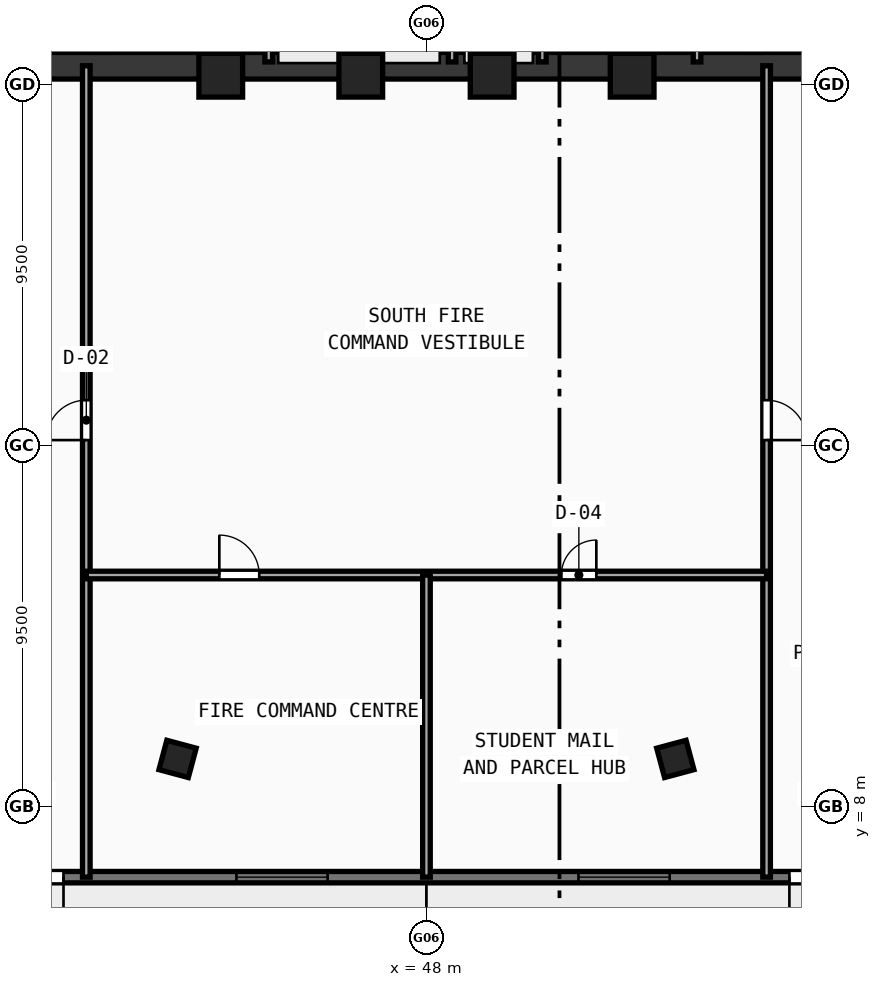
"""IFC4 building model, lengths in metres.
Left out: names, types, materials, properties, quantities, classifications, styles, units other than length and angle.
Written with IfcOpenShell. Run it as: python <this file> out.ifc"""

import sys

from ifc_helpers import new_model, si_unit, direction, frame, frame_2d, origin, origin_with_axes, origin_2d, place, context, subcontext, project, spatial, rectangle, hollow_rectangle, extrude, source, transform, mapped, element, fill, save


model = new_model("IFC4")
c1 = context("Model", 3, precision=1e-05, world=origin(), true_north=direction((0.0, 1.0)))
c2 = subcontext(c1, "Body", "Model", "MODEL_VIEW")
j1 = project(units=[si_unit("LENGTHUNIT", "METRE"), si_unit("PLANEANGLEUNIT", "RADIAN")], contexts=[c1])
p1 = place(None, origin())
s1 = spatial("IfcSite", under=j1, at=p1, CompositionType="ELEMENT")
p2 = place(p1, origin())
s2 = spatial("IfcBuilding", under=s1, at=p2, CompositionType="ELEMENT")
p3 = place(p2, origin())
s3 = spatial("IfcBuildingStorey", under=s2, at=p3, CompositionType="ELEMENT", Elevation=0.0)
p4 = place(p3, frame((35.45, 27.5, 0.0), z_axis=(0.0, 0.0, 1.0), x_axis=(1.0, 0.0, 0.0)))
e1 = element("IfcWall", 1, at=p4, inside=s3, PredefinedType="SHEAR", context=c2, shape_type="SweptSolid", body=[
    extrude(rectangle(XDim=25.1, YDim=0.7, at=frame_2d((12.55, 0.0))), origin(), (0.0, 0.0, 1.0), 4.52),
])
m1 = source(origin(), c2, "Body", "SweptSolid", [
    extrude(hollow_rectangle(XDim=1.15, YDim=1.15, WallThickness=0.048, at=origin_2d()), origin(), (0.0, 0.0, 1.0), 4.8),
])
for number, where, z_axis, x_axis in (
    (2, (42.588, 27.25, -0.28), (0.0, 0.0, 1.0), (1.0, 0.0, 0.0)),
    (3, (46.272, 27.25, -0.28), (0.0, 0.0, 1.0), (1.0, 0.0, 0.0)),
    (4, (49.729, 27.25, -0.28), (0.0, 0.0, 1.0), (1.0, 0.0, 0.0)),
    (5, (53.412, 27.25, -0.28), (0.0, 0.0, 1.0), (1.0, 0.0, 0.0)),
):
    element("IfcColumn", number, at=place(p3, frame(where, z_axis=z_axis, x_axis=x_axis)), inside=s3, PredefinedType="COLUMN", context=c2, shape_type="MappedRepresentation", body=[
        mapped(m1, transform((0.0, 0.0, 0.0), scale=1.0)),
    ])
m2 = source(origin(), c2, "Body", "SweptSolid", [
    extrude(hollow_rectangle(XDim=0.8, YDim=0.8, WallThickness=0.032, at=origin_2d()), origin(), (0.0, 0.0, 1.0), 4.8),
])
for number, where, z_axis, x_axis in (
    (6, (41.452, 9.261, -0.28), (0.0, 0.0, 1.0), (0.966, -0.259, 0.0)),
    (7, (54.548, 9.261, -0.28), (0.0, 0.0, 1.0), (0.966, 0.259, 0.0)),
):
    element("IfcColumn", number, at=place(p3, frame(where, z_axis=z_axis, x_axis=x_axis)), inside=s3, PredefinedType="COLUMN", context=c2, shape_type="MappedRepresentation", body=[
        mapped(m2, transform((0.0, 0.0, 0.0), scale=1.0)),
    ])
p5 = place(p3, frame((4.0, 6.15, 0.0), z_axis=(0.0, 0.0, 1.0), x_axis=(1.0, 0.0, 0.0)))
e8 = element("IfcWall", 8, at=p5, inside=s3, PredefinedType="STANDARD", context=c2, shape_type="SweptSolid", body=[
    extrude(rectangle(XDim=88.0, YDim=0.3, at=frame_2d((44.0, 0.0))), origin(), (0.0, 0.0, 1.0), 4.52),
])
p6 = place(p5, frame((32.05, 0.0, 0.0)))
e9 = element("IfcOpeningElement", 9, at=p6, cuts=e8, PredefinedType="OPENING", context=c2, shape_type="SweptSolid", body=[
    extrude(rectangle(XDim=2.4, YDim=2.2, at=frame_2d((1.2, 1.1))), frame((0.0, 0.16, 0.0), z_axis=(0.0, -1.0, 0.0), x_axis=(1.0, 0.0, 0.0)), (0.0, 0.0, 1.0), 0.32),
])
p7 = place(p5, frame((53.55, 0.0, 0.0)))
e10 = element("IfcOpeningElement", 10, at=p7, cuts=e8, PredefinedType="OPENING", context=c2, shape_type="SweptSolid", body=[
    extrude(rectangle(XDim=2.4, YDim=2.2, at=frame_2d((1.2, 1.1))), frame((0.0, 0.16, 0.0), z_axis=(0.0, -1.0, 0.0), x_axis=(1.0, 0.0, 0.0)), (0.0, 0.0, 1.0), 0.32),
])
p8 = place(p5, frame((68.0, 0.0, 0.0)))
e11 = element("IfcOpeningElement", 11, at=p8, cuts=e8, PredefinedType="OPENING", context=c2, shape_type="SweptSolid", body=[
    extrude(rectangle(XDim=2.4, YDim=2.2, at=frame_2d((1.2, 1.1))), frame((0.0, 0.16, 0.0), z_axis=(0.0, -1.0, 0.0), x_axis=(1.0, 0.0, 0.0)), (0.0, 0.0, 1.0), 0.32),
])
p9 = place(p5, frame((78.0, 0.0, 0.0)))
e12 = element("IfcOpeningElement", 12, at=p9, cuts=e8, PredefinedType="OPENING", context=c2, shape_type="SweptSolid", body=[
    extrude(rectangle(XDim=2.4, YDim=2.2, at=frame_2d((1.2, 1.1))), frame((0.0, 0.16, 0.0), z_axis=(0.0, -1.0, 0.0), x_axis=(1.0, 0.0, 0.0)), (0.0, 0.0, 1.0), 0.32),
])
p10 = place(p5, frame((9.0, 0.0, 0.9)))
e13 = element("IfcOpeningElement", 13, at=p10, cuts=e8, PredefinedType="OPENING", context=c2, shape_type="SweptSolid", body=[
    extrude(rectangle(XDim=2.4, YDim=1.8, at=frame_2d((1.2, 0.9))), frame((0.0, 0.16, 0.0), z_axis=(0.0, -1.0, 0.0), x_axis=(1.0, 0.0, 0.0)), (0.0, 0.0, 1.0), 0.32),
])
p11 = place(p5, frame((20.5, 0.0, 0.9)))
e14 = element("IfcOpeningElement", 14, at=p11, cuts=e8, PredefinedType="OPENING", context=c2, shape_type="SweptSolid", body=[
    extrude(rectangle(XDim=2.4, YDim=1.8, at=frame_2d((1.2, 0.9))), frame((0.0, 0.16, 0.0), z_axis=(0.0, -1.0, 0.0), x_axis=(1.0, 0.0, 0.0)), (0.0, 0.0, 1.0), 0.32),
])
p12 = place(p5, frame((39.0, 0.0, 0.9)))
e15 = element("IfcOpeningElement", 15, at=p12, cuts=e8, PredefinedType="OPENING", context=c2, shape_type="SweptSolid", body=[
    extrude(rectangle(XDim=2.4, YDim=1.8, at=frame_2d((1.2, 0.9))), frame((0.0, 0.16, 0.0), z_axis=(0.0, -1.0, 0.0), x_axis=(1.0, 0.0, 0.0)), (0.0, 0.0, 1.0), 0.32),
])
p13 = place(p5, frame((48.0, 0.0, 0.9)))
e16 = element("IfcOpeningElement", 16, at=p13, cuts=e8, PredefinedType="OPENING", context=c2, shape_type="SweptSolid", body=[
    extrude(rectangle(XDim=2.4, YDim=1.8, at=frame_2d((1.2, 0.9))), frame((0.0, 0.16, 0.0), z_axis=(0.0, -1.0, 0.0), x_axis=(1.0, 0.0, 0.0)), (0.0, 0.0, 1.0), 0.32),
])
p14 = place(p5, frame((61.5, 0.0, 0.9)))
e17 = element("IfcOpeningElement", 17, at=p14, cuts=e8, PredefinedType="OPENING", context=c2, shape_type="SweptSolid", body=[
    extrude(rectangle(XDim=2.4, YDim=1.8, at=frame_2d((1.2, 0.9))), frame((0.0, 0.16, 0.0), z_axis=(0.0, -1.0, 0.0), x_axis=(1.0, 0.0, 0.0)), (0.0, 0.0, 1.0), 0.32),
])
p15 = place(p3, frame((43.85, 27.6, 0.0), z_axis=(0.0, 0.0, 1.0), x_axis=(0.0, 1.0, 0.0)))
e18 = element("IfcWall", 18, at=p15, inside=s3, PredefinedType="SOLIDWALL", context=c2, shape_type="SweptSolid", body=[
    extrude(rectangle(XDim=6.22, YDim=0.2, at=frame_2d((3.11, 0.0))), origin(), (0.0, 0.0, 1.0), 4.52),
])
p16 = place(p15, frame((2.25, 0.0, 0.0)))
e19 = element("IfcOpeningElement", 19, at=p16, cuts=e18, PredefinedType="OPENING", context=c2, shape_type="SweptSolid", body=[
    extrude(rectangle(XDim=1.05, YDim=2.1, at=frame_2d((0.525, 1.05))), frame((0.0, 0.11, 0.0), z_axis=(0.0, -1.0, 0.0), x_axis=(1.0, 0.0, 0.0)), (0.0, 0.0, 1.0), 0.22),
])
p17 = place(p3, frame((53.68, 27.6, 0.0), z_axis=(0.0, 0.0, 1.0), x_axis=(0.0, 1.0, 0.0)))
e20 = element("IfcWall", 20, at=p17, inside=s3, PredefinedType="SOLIDWALL", context=c2, shape_type="SweptSolid", body=[
    extrude(rectangle(XDim=9.05, YDim=0.2, at=frame_2d((4.525, 0.0))), origin(), (0.0, 0.0, 1.0), 4.52),
])
p18 = place(p17, frame((6.9, 0.0, 0.0)))
e21 = element("IfcOpeningElement", 21, at=p18, cuts=e20, PredefinedType="OPENING", context=c2, shape_type="SweptSolid", body=[
    extrude(rectangle(XDim=1.05, YDim=2.1, at=frame_2d((0.525, 1.05))), frame((0.0, 0.11, 0.0), z_axis=(0.0, -1.0, 0.0), x_axis=(1.0, 0.0, 0.0)), (0.0, 0.0, 1.0), 0.22),
])
for number, where, z_axis, x_axis in (
    (22, (51.05, 27.6, 0.0), (0.0, 0.0, 1.0), (0.0, 1.0, 0.0)),
    (23, (46.225, 27.6, 0.0), (0.0, 0.0, 1.0), (0.0, 1.0, 0.0)),
    (24, (48.675, 27.6, 0.0), (0.0, 0.0, 1.0), (0.0, 1.0, 0.0)),
    (25, (55.12, 27.6, 0.0), (0.0, 0.0, 1.0), (0.0, 1.0, 0.0)),
):
    element("IfcWall", number, at=place(p3, frame(where, z_axis=z_axis, x_axis=x_axis)), inside=s3, PredefinedType="SOLIDWALL", context=c2, shape_type="SweptSolid", body=[
        extrude(rectangle(XDim=2.12, YDim=0.2, at=frame_2d((1.06, 0.0))), origin(), (0.0, 0.0, 1.0), 4.52),
    ])
p19 = place(p3, frame((42.32, 27.6, 0.0), z_axis=(0.0, 0.0, 1.0), x_axis=(0.0, 1.0, 0.0)))
e26 = element("IfcWall", 26, at=p19, inside=s3, PredefinedType="PARTITIONING", context=c2, shape_type="SweptSolid", body=[
    extrude(rectangle(XDim=5.9, YDim=0.16, at=frame_2d((2.95, 0.0))), origin(), (0.0, 0.0, 1.0), 4.52),
])
p20 = place(p19, frame((0.5, 0.0, 0.0)))
e27 = element("IfcOpeningElement", 27, at=p20, cuts=e26, PredefinedType="OPENING", context=c2, shape_type="SweptSolid", body=[
    extrude(rectangle(XDim=0.9, YDim=2.1, at=frame_2d((0.45, 1.05))), frame((0.0, 0.09, 0.0), z_axis=(0.0, -1.0, 0.0), x_axis=(1.0, 0.0, 0.0)), (0.0, 0.0, 1.0), 0.18),
])
p21 = place(p19, frame((2.45, 0.0, 0.0)))
e28 = element("IfcOpeningElement", 28, at=p21, cuts=e26, PredefinedType="OPENING", context=c2, shape_type="SweptSolid", body=[
    extrude(rectangle(XDim=0.9, YDim=2.1, at=frame_2d((0.45, 1.05))), frame((0.0, 0.09, 0.0), z_axis=(0.0, -1.0, 0.0), x_axis=(1.0, 0.0, 0.0)), (0.0, 0.0, 1.0), 0.18),
])
p22 = place(p19, frame((4.42, 0.0, 0.0)))
e29 = element("IfcOpeningElement", 29, at=p22, cuts=e26, PredefinedType="OPENING", context=c2, shape_type="SweptSolid", body=[
    extrude(rectangle(XDim=0.94, YDim=2.1, at=frame_2d((0.47, 1.05))), frame((0.0, 0.09, 0.0), z_axis=(0.0, -1.0, 0.0), x_axis=(1.0, 0.0, 0.0)), (0.0, 0.0, 1.0), 0.18),
])
p23 = place(p3, frame((39.05, 6.15, 0.0), z_axis=(0.0, 0.0, 1.0), x_axis=(0.0, 1.0, 0.0)))
e30 = element("IfcWall", 30, at=p23, inside=s3, PredefinedType="SOLIDWALL", context=c2, shape_type="SweptSolid", body=[
    extrude(rectangle(XDim=21.35, YDim=0.2, at=frame_2d((10.675, 0.0))), origin(), (0.0, 0.0, 1.0), 3.62),
])
p24 = place(p23, frame((11.5, 0.0, 0.0)))
e31 = element("IfcOpeningElement", 31, at=p24, cuts=e30, PredefinedType="OPENING", context=c2, shape_type="SweptSolid", body=[
    extrude(rectangle(XDim=1.05, YDim=2.1, at=frame_2d((0.525, 1.05))), frame((0.0, 0.11, 0.0), z_axis=(0.0, -1.0, 0.0), x_axis=(1.0, 0.0, 0.0)), (0.0, 0.0, 1.0), 0.22),
])
p25 = place(p3, frame((56.95, 6.15, 0.0), z_axis=(0.0, 0.0, 1.0), x_axis=(0.0, 1.0, 0.0)))
e32 = element("IfcWall", 32, at=p25, inside=s3, PredefinedType="SOLIDWALL", context=c2, shape_type="SweptSolid", body=[
    extrude(rectangle(XDim=21.35, YDim=0.2, at=frame_2d((10.675, 0.0))), origin(), (0.0, 0.0, 1.0), 3.62),
])
p26 = place(p25, frame((11.5, 0.0, 0.0)))
e33 = element("IfcOpeningElement", 33, at=p26, cuts=e32, PredefinedType="OPENING", context=c2, shape_type="SweptSolid", body=[
    extrude(rectangle(XDim=1.05, YDim=2.1, at=frame_2d((0.525, 1.05))), frame((0.0, 0.11, 0.0), z_axis=(0.0, -1.0, 0.0), x_axis=(1.0, 0.0, 0.0)), (0.0, 0.0, 1.0), 0.22),
])
p27 = place(p3, frame((39.05, 14.1, 0.0), z_axis=(0.0, 0.0, 1.0), x_axis=(1.0, 0.0, 0.0)))
e34 = element("IfcWall", 34, at=p27, inside=s3, PredefinedType="SOLIDWALL", context=c2, shape_type="SweptSolid", body=[
    extrude(rectangle(XDim=17.9, YDim=0.2, at=frame_2d((8.95, 0.0))), origin(), (0.0, 0.0, 1.0), 4.52),
])
p28 = place(p27, frame((3.5, 0.0, 0.0)))
e35 = element("IfcOpeningElement", 35, at=p28, cuts=e34, PredefinedType="OPENING", context=c2, shape_type="SweptSolid", body=[
    extrude(rectangle(XDim=1.05, YDim=2.1, at=frame_2d((0.525, 1.05))), frame((0.0, 0.11, 0.0), z_axis=(0.0, -1.0, 0.0), x_axis=(1.0, 0.0, 0.0)), (0.0, 0.0, 1.0), 0.22),
])
p29 = place(p27, frame((12.5, 0.0, 0.0)))
e36 = element("IfcOpeningElement", 36, at=p29, cuts=e34, PredefinedType="OPENING", context=c2, shape_type="SweptSolid", body=[
    extrude(rectangle(XDim=0.92, YDim=2.1, at=frame_2d((0.46, 1.05))), frame((0.0, 0.11, 0.0), z_axis=(0.0, -1.0, 0.0), x_axis=(1.0, 0.0, 0.0)), (0.0, 0.0, 1.0), 0.22),
])
p30 = place(p3, frame((48.0, 6.15, 0.0), z_axis=(0.0, 0.0, 1.0), x_axis=(0.0, 1.0, 0.0)))
e37 = element("IfcWall", 37, at=p30, inside=s3, PredefinedType="SOLIDWALL", context=c2, shape_type="SweptSolid", body=[
    extrude(rectangle(XDim=7.95, YDim=0.2, at=frame_2d((3.975, 0.0))), origin(), (0.0, 0.0, 1.0), 3.72),
])
m3 = source(origin(), c2, "Body", "SweptSolid", [
    extrude(rectangle(XDim=2.4, YDim=2.2, at=frame_2d((1.2, 1.1))), frame((0.0, 0.025, 0.0), z_axis=(0.0, -1.0, 0.0), x_axis=(1.0, 0.0, 0.0)), (0.0, 0.0, 1.0), 0.05),
])
p31 = place(p6, frame((2.4, 0.0, 0.0), z_axis=(0.0, 0.0, 1.0), x_axis=(-1.0, 0.0, 0.0)))
e38 = element("IfcDoor", 38, at=p31, inside=s3, OperationType="DOUBLE_DOOR_SINGLE_SWING", PredefinedType="DOOR", context=c2, shape_type="MappedRepresentation", body=[
    mapped(m3, transform((0.0, 0.0, 0.0), scale=1.0)),
])
fill(e9, e38)
p32 = place(p7, frame((2.4, 0.0, 0.0), z_axis=(0.0, 0.0, 1.0), x_axis=(-1.0, 0.0, 0.0)))
e39 = element("IfcDoor", 39, at=p32, inside=s3, OperationType="DOUBLE_DOOR_SINGLE_SWING", PredefinedType="DOOR", context=c2, shape_type="MappedRepresentation", body=[
    mapped(m3, transform((0.0, 0.0, 0.0), scale=1.0)),
])
fill(e10, e39)
m4 = source(origin(), c2, "Body", "SweptSolid", [
    extrude(rectangle(XDim=2.4, YDim=1.8, at=frame_2d((1.2, 0.9))), frame((0.0, 0.03, 0.0), z_axis=(0.0, -1.0, 0.0), x_axis=(1.0, 0.0, 0.0)), (0.0, 0.0, 1.0), 0.06),
])
p33 = place(p12, origin_with_axes())
e40 = element("IfcWindow", 40, at=p33, inside=s3, PartitioningType="SINGLE_PANEL", PredefinedType="WINDOW", context=c2, shape_type="MappedRepresentation", body=[
    mapped(m4, transform((0.0, 0.0, 0.0), scale=1.0)),
])
fill(e15, e40)
p34 = place(p13, origin_with_axes())
e41 = element("IfcWindow", 41, at=p34, inside=s3, PartitioningType="SINGLE_PANEL", PredefinedType="WINDOW", context=c2, shape_type="MappedRepresentation", body=[
    mapped(m4, transform((0.0, 0.0, 0.0), scale=1.0)),
])
fill(e16, e41)
m5 = source(origin(), c2, "Body", "SweptSolid", [
    extrude(rectangle(XDim=1.05, YDim=2.1, at=frame_2d((0.525, 1.05))), frame((0.0, 0.025, 0.0), z_axis=(0.0, -1.0, 0.0), x_axis=(1.0, 0.0, 0.0)), (0.0, 0.0, 1.0), 0.05),
])
p35 = place(p24, origin_with_axes())
e42 = element("IfcDoor", 42, at=p35, inside=s3, OperationType="SINGLE_SWING_LEFT", PredefinedType="DOOR", context=c2, shape_type="MappedRepresentation", body=[
    mapped(m5, transform((0.0, 0.0, 0.0), scale=1.0)),
])
fill(e31, e42)
p36 = place(p26, frame((1.05, 0.0, 0.0), z_axis=(0.0, 0.0, 1.0), x_axis=(-1.0, 0.0, 0.0)))
e43 = element("IfcDoor", 43, at=p36, inside=s3, OperationType="SINGLE_SWING_RIGHT", PredefinedType="DOOR", context=c2, shape_type="MappedRepresentation", body=[
    mapped(m5, transform((0.0, 0.0, 0.0), scale=1.0)),
])
fill(e33, e43)
p37 = place(p28, origin_with_axes())
e44 = element("IfcDoor", 44, at=p37, inside=s3, OperationType="SINGLE_SWING_LEFT", PredefinedType="DOOR", context=c2, shape_type="MappedRepresentation", body=[
    mapped(m5, transform((0.0, 0.0, 0.0), scale=1.0)),
])
fill(e35, e44)
m6 = source(origin(), c2, "Body", "SweptSolid", [
    extrude(rectangle(XDim=0.92, YDim=2.1, at=frame_2d((0.46, 1.05))), frame((0.0, 0.025, 0.0), z_axis=(0.0, -1.0, 0.0), x_axis=(1.0, 0.0, 0.0)), (0.0, 0.0, 1.0), 0.05),
])
p38 = place(p29, origin_with_axes())
e45 = element("IfcDoor", 45, at=p38, inside=s3, OperationType="SINGLE_SWING_RIGHT", PredefinedType="DOOR", context=c2, shape_type="MappedRepresentation", body=[
    mapped(m6, transform((0.0, 0.0, 0.0), scale=1.0)),
])
fill(e36, e45)
save(model, sys.argv[1])
